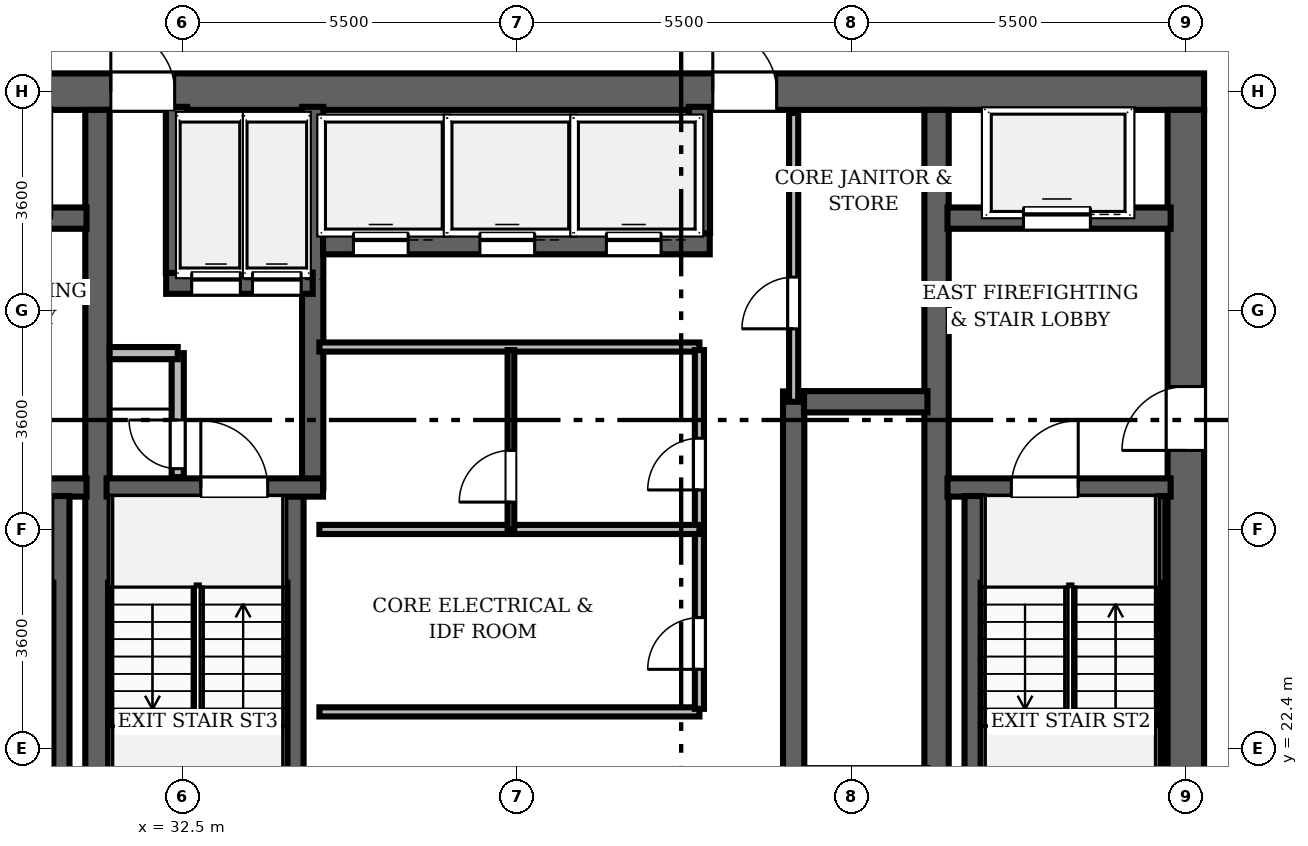
"""IFC4 building model, lengths in metres.
Left out: names, types, materials, properties, quantities, classifications, styles, units other than length and angle.
Written with IfcOpenShell. Run it as: python <this file> out.ifc"""

import sys

from ifc_helpers import new_model, si_unit, direction, frame, frame_2d, origin, place, context, subcontext, project, spatial, rectangle, extrude, element, fill, save


model = new_model("IFC4")
c1 = context("Model", 3, precision=1e-05, world=origin(), true_north=direction((0.0, 1.0)))
c2 = subcontext(c1, "Body", "Model", "MODEL_VIEW")
j1 = project(units=[si_unit("LENGTHUNIT", "METRE"), si_unit("PLANEANGLEUNIT", "RADIAN")], contexts=[c1])
p1 = place(None, origin())
s1 = spatial("IfcSite", under=j1, at=p1, CompositionType="ELEMENT")
p2 = place(p1, origin())
s2 = spatial("IfcBuilding", under=s1, at=p2, CompositionType="ELEMENT")
p3 = place(p2, frame((0.0, 0.0, 35.4)))
s3 = spatial("IfcBuildingStorey", under=s2, at=p3, CompositionType="ELEMENT", Elevation=35.4)
p4 = place(p3, frame((26.7, 33.2, 0.0), z_axis=(0.0, 0.0, 1.0), x_axis=(1.0, 0.0, 0.0)))
e1 = element("IfcWall", 1, at=p4, inside=s3, PredefinedType="SHEAR", context=c2, shape_type="SweptSolid", body=[
    extrude(rectangle(XDim=22.6, YDim=0.6, at=frame_2d((11.3, 0.0))), origin(), (0.0, 0.0, 1.0), 6.0),
])
p5 = place(p4, frame((4.62, 0.0, 0.0)))
e2 = element("IfcOpeningElement", 2, at=p5, cuts=e1, PredefinedType="OPENING", context=c2, shape_type="SweptSolid", body=[
    extrude(rectangle(XDim=1.05, YDim=2.15, at=frame_2d((0.525, 1.075))), frame((0.0, 0.31, 0.0), z_axis=(0.0, -1.0, 0.0), x_axis=(1.0, 0.0, 0.0)), (0.0, 0.0, 1.0), 0.62),
])
p6 = place(p4, frame((14.52, 0.0, 0.0)))
e3 = element("IfcOpeningElement", 3, at=p6, cuts=e1, PredefinedType="OPENING", context=c2, shape_type="SweptSolid", body=[
    extrude(rectangle(XDim=1.05, YDim=2.15, at=frame_2d((0.525, 1.075))), frame((0.0, 0.31, 0.0), z_axis=(0.0, -1.0, 0.0), x_axis=(1.0, 0.0, 0.0)), (0.0, 0.0, 1.0), 0.62),
])
p7 = place(p3, frame((49.0, 19.1, 0.0), z_axis=(0.0, 0.0, 1.0), x_axis=(0.0, 1.0, 0.0)))
e4 = element("IfcWall", 4, at=p7, inside=s3, PredefinedType="SHEAR", context=c2, shape_type="SweptSolid", body=[
    extrude(rectangle(XDim=13.8, YDim=0.6, at=frame_2d((6.9, 0.0))), origin(), (0.0, 0.0, 1.0), 6.0),
])
p8 = place(p7, frame((8.2, 0.0, 0.0)))
e5 = element("IfcOpeningElement", 5, at=p8, cuts=e4, PredefinedType="OPENING", context=c2, shape_type="SweptSolid", body=[
    extrude(rectangle(XDim=1.05, YDim=2.15, at=frame_2d((0.525, 1.075))), frame((0.0, 0.31, 0.0), z_axis=(0.0, -1.0, 0.0), x_axis=(1.0, 0.0, 0.0)), (0.0, 0.0, 1.0), 0.62),
])
for number, where, z_axis, x_axis in (
    (6, (31.1, 19.1, 0.0), (0.0, 0.0, 1.0), (0.0, 1.0, 0.0)),
    (7, (44.9, 19.1, 0.0), (0.0, 0.0, 1.0), (0.0, 1.0, 0.0)),
):
    element("IfcWall", number, at=place(p3, frame(where, z_axis=z_axis, x_axis=x_axis)), inside=s3, PredefinedType="SHEAR", context=c2, shape_type="SweptSolid", body=[
        extrude(rectangle(XDim=13.8, YDim=0.4, at=frame_2d((6.9, 0.0))), origin(), (0.0, 0.0, 1.0), 6.0),
    ])
p9 = place(p3, frame((27.25, 26.69, 0.0), z_axis=(0.0, 0.0, 1.0), x_axis=(1.0, 0.0, 0.0)))
e8 = element("IfcWall", 8, at=p9, inside=s3, PredefinedType="SHEAR", context=c2, shape_type="SweptSolid", body=[
    extrude(rectangle(XDim=3.67, YDim=0.3, at=frame_2d((1.835, 0.0))), origin(), (0.0, 0.0, 1.0), 6.0),
])
p10 = place(p9, frame((1.05, 0.0, 0.0)))
e9 = element("IfcOpeningElement", 9, at=p10, cuts=e8, PredefinedType="OPENING", context=c2, shape_type="SweptSolid", body=[
    extrude(rectangle(XDim=1.1, YDim=2.15, at=frame_2d((0.55, 1.075))), frame((0.0, 0.16, 0.0), z_axis=(0.0, -1.0, 0.0), x_axis=(1.0, 0.0, 0.0)), (0.0, 0.0, 1.0), 0.32),
])
p11 = place(p3, frame((30.49, 19.05, 0.0), z_axis=(0.0, 0.0, 1.0), x_axis=(0.0, 1.0, 0.0)))
e10 = element("IfcWall", 10, at=p11, inside=s3, PredefinedType="SHEAR", context=c2, shape_type="SweptSolid", body=[
    extrude(rectangle(XDim=7.5, YDim=0.3, at=frame_2d((3.75, 0.0))), origin(), (0.0, 0.0, 1.0), 6.0),
])
p12 = place(p3, frame((27.25, 31.12, 0.0), z_axis=(0.0, 0.0, 1.0), x_axis=(1.0, 0.0, 0.0)))
e11 = element("IfcWall", 11, at=p12, inside=s3, PredefinedType="SHEAR", context=c2, shape_type="SweptSolid", body=[
    extrude(rectangle(XDim=3.67, YDim=0.35, at=frame_2d((1.835, 0.0))), origin(), (0.0, 0.0, 1.0), 4.81),
])
p13 = place(p12, frame((1.25, 0.0, 0.0)))
e12 = element("IfcOpeningElement", 12, at=p13, cuts=e11, PredefinedType="OPENING", context=c2, shape_type="SweptSolid", body=[
    extrude(rectangle(XDim=1.1, YDim=2.15, at=frame_2d((0.55, 1.075))), frame((0.0, 0.185, 0.0), z_axis=(0.0, -1.0, 0.0), x_axis=(1.0, 0.0, 0.0)), (0.0, 0.0, 1.0), 0.37),
])
p14 = place(p3, frame((45.08, 26.69, 0.0), z_axis=(0.0, 0.0, 1.0), x_axis=(1.0, 0.0, 0.0)))
e13 = element("IfcWall", 13, at=p14, inside=s3, PredefinedType="SHEAR", context=c2, shape_type="SweptSolid", body=[
    extrude(rectangle(XDim=3.67, YDim=0.3, at=frame_2d((1.835, 0.0))), origin(), (0.0, 0.0, 1.0), 6.0),
])
p15 = place(p14, frame((1.05, 0.0, 0.0)))
e14 = element("IfcOpeningElement", 14, at=p15, cuts=e13, PredefinedType="OPENING", context=c2, shape_type="SweptSolid", body=[
    extrude(rectangle(XDim=1.1, YDim=2.15, at=frame_2d((0.55, 1.075))), frame((0.0, 0.16, 0.0), z_axis=(0.0, -1.0, 0.0), x_axis=(1.0, 0.0, 0.0)), (0.0, 0.0, 1.0), 0.32),
])
p16 = place(p3, frame((45.51, 19.05, 0.0), z_axis=(0.0, 0.0, 1.0), x_axis=(0.0, 1.0, 0.0)))
e15 = element("IfcWall", 15, at=p16, inside=s3, PredefinedType="SHEAR", context=c2, shape_type="SweptSolid", body=[
    extrude(rectangle(XDim=7.5, YDim=0.3, at=frame_2d((3.75, 0.0))), origin(), (0.0, 0.0, 1.0), 6.0),
])
p17 = place(p3, frame((48.605, 19.1, 0.0), z_axis=(0.0, 0.0, 1.0), x_axis=(0.0, 1.0, 0.0)))
e16 = element("IfcWall", 16, at=p17, inside=s3, PredefinedType="SHEAR", context=c2, shape_type="SweptSolid", body=[
    extrude(rectangle(XDim=7.45, YDim=0.12, at=frame_2d((3.725, 0.0))), origin(), (0.0, 0.0, 1.0), 6.0),
])
p18 = place(p3, frame((45.08, 31.12, 0.0), z_axis=(0.0, 0.0, 1.0), x_axis=(1.0, 0.0, 0.0)))
e17 = element("IfcWall", 17, at=p18, inside=s3, PredefinedType="SHEAR", context=c2, shape_type="SweptSolid", body=[
    extrude(rectangle(XDim=3.67, YDim=0.35, at=frame_2d((1.835, 0.0))), origin(), (0.0, 0.0, 1.0), 4.81),
])
p19 = place(p18, frame((1.25, 0.0, 0.0)))
e18 = element("IfcOpeningElement", 18, at=p19, cuts=e17, PredefinedType="OPENING", context=c2, shape_type="SweptSolid", body=[
    extrude(rectangle(XDim=1.1, YDim=2.15, at=frame_2d((0.55, 1.075))), frame((0.0, 0.185, 0.0), z_axis=(0.0, -1.0, 0.0), x_axis=(1.0, 0.0, 0.0)), (0.0, 0.0, 1.0), 0.37),
])
p20 = place(p3, frame((34.34, 19.05, 0.0), z_axis=(0.0, 0.0, 1.0), x_axis=(0.0, 1.0, 0.0)))
e19 = element("IfcWall", 19, at=p20, inside=s3, PredefinedType="SHEAR", context=c2, shape_type="SweptSolid", body=[
    extrude(rectangle(XDim=7.5, YDim=0.3, at=frame_2d((3.75, 0.0))), origin(), (0.0, 0.0, 1.0), 6.0),
])
p21 = place(p3, frame((34.64, 26.69, 0.0), z_axis=(0.0, 0.0, 1.0), x_axis=(0.0, 1.0, 0.0)))
e20 = element("IfcWall", 20, at=p21, inside=s3, PredefinedType="SHEAR", context=c2, shape_type="SweptSolid", body=[
    extrude(rectangle(XDim=6.26, YDim=0.35, at=frame_2d((3.13, 0.0))), origin(), (0.0, 0.0, 1.0), 6.0),
])
p22 = place(p3, frame((31.25, 26.69, 0.0), z_axis=(0.0, 0.0, 1.0), x_axis=(1.0, 0.0, 0.0)))
e21 = element("IfcWall", 21, at=p22, inside=s3, PredefinedType="SHEAR", context=c2, shape_type="SweptSolid", body=[
    extrude(rectangle(XDim=3.56, YDim=0.3, at=frame_2d((1.78, 0.0))), origin(), (0.0, 0.0, 1.0), 6.0),
])
p23 = place(p22, frame((1.55, 0.0, 0.0)))
e22 = element("IfcOpeningElement", 22, at=p23, cuts=e21, PredefinedType="OPENING", context=c2, shape_type="SweptSolid", body=[
    extrude(rectangle(XDim=1.1, YDim=2.15, at=frame_2d((0.55, 1.075))), frame((0.0, 0.16, 0.0), z_axis=(0.0, -1.0, 0.0), x_axis=(1.0, 0.0, 0.0)), (0.0, 0.0, 1.0), 0.32),
])
p24 = place(p3, frame((32.23, 30.05, 0.0), z_axis=(0.0, 0.0, 1.0), x_axis=(1.0, 0.0, 0.0)))
e23 = element("IfcWall", 23, at=p24, inside=s3, PredefinedType="SHEAR", context=c2, shape_type="SweptSolid", body=[
    extrude(rectangle(XDim=2.41, YDim=0.35, at=frame_2d((1.205, 0.0))), origin(), (0.0, 0.0, 1.0), 4.81),
])
p25 = place(p24, frame((0.42, 0.0, 0.0)))
e24 = element("IfcOpeningElement", 24, at=p25, cuts=e23, PredefinedType="OPENING", context=c2, shape_type="SweptSolid", body=[
    extrude(rectangle(XDim=0.8, YDim=2.15, at=frame_2d((0.4, 1.075))), frame((0.0, 0.185, 0.0), z_axis=(0.0, -1.0, 0.0), x_axis=(1.0, 0.0, 0.0)), (0.0, 0.0, 1.0), 0.37),
])
p26 = place(p24, frame((1.42, 0.0, 0.0)))
e25 = element("IfcOpeningElement", 25, at=p26, cuts=e23, PredefinedType="OPENING", context=c2, shape_type="SweptSolid", body=[
    extrude(rectangle(XDim=0.8, YDim=2.15, at=frame_2d((0.4, 1.075))), frame((0.0, 0.185, 0.0), z_axis=(0.0, -1.0, 0.0), x_axis=(1.0, 0.0, 0.0)), (0.0, 0.0, 1.0), 0.37),
])
p27 = place(p3, frame((32.4, 30.22, 0.0), z_axis=(0.0, 0.0, 1.0), x_axis=(0.0, 1.0, 0.0)))
e26 = element("IfcWall", 26, at=p27, inside=s3, PredefinedType="SHEAR", context=c2, shape_type="SweptSolid", body=[
    extrude(rectangle(XDim=2.73, YDim=0.35, at=frame_2d((1.365, 0.0))), origin(), (0.0, 0.0, 1.0), 4.81),
])
p28 = place(p3, frame((32.42, 26.86, 0.0), z_axis=(0.0, 0.0, 1.0), x_axis=(0.0, 1.0, 0.0)))
e27 = element("IfcWall", 27, at=p28, inside=s3, PredefinedType="PARTITIONING", context=c2, shape_type="SweptSolid", body=[
    extrude(rectangle(XDim=2.04, YDim=0.2, at=frame_2d((1.02, 0.0))), origin(), (0.0, 0.0, 1.0), 4.81),
])
p29 = place(p28, frame((0.14, 0.0, 0.0)))
e28 = element("IfcOpeningElement", 28, at=p29, cuts=e27, PredefinedType="OPENING", context=c2, shape_type="SweptSolid", body=[
    extrude(rectangle(XDim=0.8, YDim=2.05, at=frame_2d((0.4, 1.025))), frame((0.0, 0.11, 0.0), z_axis=(0.0, -1.0, 0.0), x_axis=(1.0, 0.0, 0.0)), (0.0, 0.0, 1.0), 0.22),
])
p30 = place(p3, frame((31.3, 28.9, 0.0), z_axis=(0.0, 0.0, 1.0), x_axis=(1.0, 0.0, 0.0)))
e29 = element("IfcWall", 29, at=p30, inside=s3, PredefinedType="PARTITIONING", context=c2, shape_type="SweptSolid", body=[
    extrude(rectangle(XDim=1.12, YDim=0.2, at=frame_2d((0.56, 0.0))), origin(), (0.0, 0.0, 1.0), 4.81),
])
p31 = place(p3, frame((42.55, 21.73, 0.0), z_axis=(0.0, 0.0, 1.0), x_axis=(0.0, 1.0, 0.0)))
e30 = element("IfcWall", 30, at=p31, inside=s3, PredefinedType="SHEAR", context=c2, shape_type="SweptSolid", body=[
    extrude(rectangle(XDim=6.54, YDim=0.35, at=frame_2d((3.27, 0.0))), origin(), (0.0, 0.0, 1.0), 4.81),
])
p32 = place(p3, frame((42.72, 28.1, 0.0), z_axis=(0.0, 0.0, 1.0), x_axis=(1.0, 0.0, 0.0)))
e31 = element("IfcWall", 31, at=p32, inside=s3, PredefinedType="SHEAR", context=c2, shape_type="SweptSolid", body=[
    extrude(rectangle(XDim=2.03, YDim=0.35, at=frame_2d((1.015, 0.0))), origin(), (0.0, 0.0, 1.0), 4.81),
])
p33 = place(p3, frame((34.81, 30.7, 0.0), z_axis=(0.0, 0.0, 1.0), x_axis=(1.0, 0.0, 0.0)))
e32 = element("IfcWall", 32, at=p33, inside=s3, PredefinedType="SHEAR", context=c2, shape_type="SweptSolid", body=[
    extrude(rectangle(XDim=6.36, YDim=0.35, at=frame_2d((3.18, 0.0))), origin(), (0.0, 0.0, 1.0), 4.81),
])
p34 = place(p33, frame((0.5, 0.0, 0.0)))
e33 = element("IfcOpeningElement", 33, at=p34, cuts=e32, PredefinedType="OPENING", context=c2, shape_type="SweptSolid", body=[
    extrude(rectangle(XDim=0.9, YDim=2.15, at=frame_2d((0.45, 1.075))), frame((0.0, 0.185, 0.0), z_axis=(0.0, -1.0, 0.0), x_axis=(1.0, 0.0, 0.0)), (0.0, 0.0, 1.0), 0.37),
])
p35 = place(p33, frame((2.58, 0.0, 0.0)))
e34 = element("IfcOpeningElement", 34, at=p35, cuts=e32, PredefinedType="OPENING", context=c2, shape_type="SweptSolid", body=[
    extrude(rectangle(XDim=0.9, YDim=2.15, at=frame_2d((0.45, 1.075))), frame((0.0, 0.185, 0.0), z_axis=(0.0, -1.0, 0.0), x_axis=(1.0, 0.0, 0.0)), (0.0, 0.0, 1.0), 0.37),
])
p36 = place(p33, frame((4.66, 0.0, 0.0)))
e35 = element("IfcOpeningElement", 35, at=p36, cuts=e32, PredefinedType="OPENING", context=c2, shape_type="SweptSolid", body=[
    extrude(rectangle(XDim=0.9, YDim=2.15, at=frame_2d((0.45, 1.075))), frame((0.0, 0.185, 0.0), z_axis=(0.0, -1.0, 0.0), x_axis=(1.0, 0.0, 0.0)), (0.0, 0.0, 1.0), 0.37),
])
p37 = place(p3, frame((41.0, 30.87, 0.0), z_axis=(0.0, 0.0, 1.0), x_axis=(0.0, 1.0, 0.0)))
e36 = element("IfcWall", 36, at=p37, inside=s3, PredefinedType="SHEAR", context=c2, shape_type="SweptSolid", body=[
    extrude(rectangle(XDim=2.08, YDim=0.35, at=frame_2d((1.04, 0.0))), origin(), (0.0, 0.0, 1.0), 4.81),
])
for number, where, z_axis, x_axis in (
    (37, (34.75, 29.0, 0.0), (0.0, 0.0, 1.0), (1.0, 0.0, 0.0)),
    (38, (34.75, 23.0, 0.0), (0.0, 0.0, 1.0), (1.0, 0.0, 0.0)),
):
    element("IfcWall", number, at=place(p3, frame(where, z_axis=z_axis, x_axis=x_axis)), inside=s3, PredefinedType="PARTITIONING", context=c2, shape_type="SweptSolid", body=[
        extrude(rectangle(XDim=6.25, YDim=0.15, at=frame_2d((3.125, 0.0))), origin(), (0.0, 0.0, 1.0), 4.81),
    ])
p38 = place(p3, frame((41.0, 23.05, 0.0), z_axis=(0.0, 0.0, 1.0), x_axis=(0.0, 1.0, 0.0)))
e39 = element("IfcWall", 39, at=p38, inside=s3, PredefinedType="PARTITIONING", context=c2, shape_type="SweptSolid", body=[
    extrude(rectangle(XDim=5.9, YDim=0.15, at=frame_2d((2.95, 0.0))), origin(), (0.0, 0.0, 1.0), 4.81),
])
p39 = place(p38, frame((0.65, 0.0, 0.0)))
e40 = element("IfcOpeningElement", 40, at=p39, cuts=e39, PredefinedType="OPENING", context=c2, shape_type="SweptSolid", body=[
    extrude(rectangle(XDim=0.85, YDim=2.1, at=frame_2d((0.425, 1.05))), frame((0.0, 0.085, 0.0), z_axis=(0.0, -1.0, 0.0), x_axis=(1.0, 0.0, 0.0)), (0.0, 0.0, 1.0), 0.17),
])
p40 = place(p38, frame((3.6, 0.0, 0.0)))
e41 = element("IfcOpeningElement", 41, at=p40, cuts=e39, PredefinedType="OPENING", context=c2, shape_type="SweptSolid", body=[
    extrude(rectangle(XDim=0.85, YDim=2.1, at=frame_2d((0.425, 1.05))), frame((0.0, 0.085, 0.0), z_axis=(0.0, -1.0, 0.0), x_axis=(1.0, 0.0, 0.0)), (0.0, 0.0, 1.0), 0.17),
])
p41 = place(p3, frame((34.75, 26.0, 0.0), z_axis=(0.0, 0.0, 1.0), x_axis=(1.0, 0.0, 0.0)))
e42 = element("IfcWall", 42, at=p41, inside=s3, PredefinedType="PARTITIONING", context=c2, shape_type="SweptSolid", body=[
    extrude(rectangle(XDim=6.25, YDim=0.15, at=frame_2d((3.125, 0.0))), origin(), (0.0, 0.0, 1.0), 4.81),
])
p42 = place(p3, frame((37.9, 26.0, 0.0), z_axis=(0.0, 0.0, 1.0), x_axis=(0.0, 1.0, 0.0)))
e43 = element("IfcWall", 43, at=p42, inside=s3, PredefinedType="PARTITIONING", context=c2, shape_type="SweptSolid", body=[
    extrude(rectangle(XDim=2.95, YDim=0.11, at=frame_2d((1.475, 0.0))), origin(), (0.0, 0.0, 1.0), 4.81),
])
p43 = place(p42, frame((0.45, 0.0, 0.0)))
e44 = element("IfcOpeningElement", 44, at=p43, cuts=e43, PredefinedType="OPENING", context=c2, shape_type="SweptSolid", body=[
    extrude(rectangle(XDim=0.85, YDim=2.1, at=frame_2d((0.425, 1.05))), frame((0.0, 0.065, 0.0), z_axis=(0.0, -1.0, 0.0), x_axis=(1.0, 0.0, 0.0)), (0.0, 0.0, 1.0), 0.13),
])
p44 = place(p3, frame((42.55, 28.1, 0.0), z_axis=(0.0, 0.0, 1.0), x_axis=(0.0, 1.0, 0.0)))
e45 = element("IfcWall", 45, at=p44, inside=s3, PredefinedType="PARTITIONING", context=c2, shape_type="SweptSolid", body=[
    extrude(rectangle(XDim=4.75, YDim=0.15, at=frame_2d((2.375, 0.0))), origin(), (0.0, 0.0, 1.0), 4.81),
])
p45 = place(p44, frame((1.2, 0.0, 0.0)))
e46 = element("IfcOpeningElement", 46, at=p45, cuts=e45, PredefinedType="OPENING", context=c2, shape_type="SweptSolid", body=[
    extrude(rectangle(XDim=0.85, YDim=2.1, at=frame_2d((0.425, 1.05))), frame((0.0, 0.085, 0.0), z_axis=(0.0, -1.0, 0.0), x_axis=(1.0, 0.0, 0.0)), (0.0, 0.0, 1.0), 0.17),
])
p46 = place(p15, origin())
e47 = element("IfcDoor", 47, at=p46, inside=s3, OperationType="SINGLE_SWING_RIGHT", PredefinedType="DOOR", context=c2, shape_type="SweptSolid", body=[
    extrude(rectangle(XDim=1.1, YDim=2.15, at=frame_2d((0.55, 1.075))), frame((0.0, 0.025, 0.0), z_axis=(0.0, -1.0, 0.0), x_axis=(1.0, 0.0, 0.0)), (0.0, 0.0, 1.0), 0.05),
])
fill(e14, e47)
p47 = place(p8, origin())
e48 = element("IfcDoor", 48, at=p47, inside=s3, OperationType="SINGLE_SWING_LEFT", PredefinedType="DOOR", context=c2, shape_type="SweptSolid", body=[
    extrude(rectangle(XDim=1.05, YDim=2.15, at=frame_2d((0.525, 1.075))), frame((0.0, 0.025, 0.0), z_axis=(0.0, -1.0, 0.0), x_axis=(1.0, 0.0, 0.0)), (0.0, 0.0, 1.0), 0.05),
])
fill(e5, e48)
p48 = place(p23, origin())
e49 = element("IfcDoor", 49, at=p48, inside=s3, OperationType="SINGLE_SWING_LEFT", PredefinedType="DOOR", context=c2, shape_type="SweptSolid", body=[
    extrude(rectangle(XDim=1.1, YDim=2.15, at=frame_2d((0.55, 1.075))), frame((0.0, 0.025, 0.0), z_axis=(0.0, -1.0, 0.0), x_axis=(1.0, 0.0, 0.0)), (0.0, 0.0, 1.0), 0.05),
])
fill(e22, e49)
p49 = place(p29, origin())
e50 = element("IfcDoor", 50, at=p49, inside=s3, OperationType="SINGLE_SWING_RIGHT", PredefinedType="DOOR", context=c2, shape_type="SweptSolid", body=[
    extrude(rectangle(XDim=0.8, YDim=2.05, at=frame_2d((0.4, 1.025))), frame((0.0, 0.025, 0.0), z_axis=(0.0, -1.0, 0.0), x_axis=(1.0, 0.0, 0.0)), (0.0, 0.0, 1.0), 0.05),
])
fill(e28, e50)
p50 = place(p5, origin())
e51 = element("IfcDoor", 51, at=p50, inside=s3, OperationType="SINGLE_SWING_LEFT", PredefinedType="DOOR", context=c2, shape_type="SweptSolid", body=[
    extrude(rectangle(XDim=1.05, YDim=2.15, at=frame_2d((0.525, 1.075))), frame((0.0, 0.025, 0.0), z_axis=(0.0, -1.0, 0.0), x_axis=(1.0, 0.0, 0.0)), (0.0, 0.0, 1.0), 0.05),
])
fill(e2, e51)
p51 = place(p6, origin())
e52 = element("IfcDoor", 52, at=p51, inside=s3, OperationType="SINGLE_SWING_LEFT", PredefinedType="DOOR", context=c2, shape_type="SweptSolid", body=[
    extrude(rectangle(XDim=1.05, YDim=2.15, at=frame_2d((0.525, 1.075))), frame((0.0, 0.025, 0.0), z_axis=(0.0, -1.0, 0.0), x_axis=(1.0, 0.0, 0.0)), (0.0, 0.0, 1.0), 0.05),
])
fill(e3, e52)
p52 = place(p39, origin())
e53 = element("IfcDoor", 53, at=p52, inside=s3, OperationType="SINGLE_SWING_LEFT", PredefinedType="DOOR", context=c2, shape_type="SweptSolid", body=[
    extrude(rectangle(XDim=0.85, YDim=2.1, at=frame_2d((0.425, 1.05))), frame((0.0, 0.025, 0.0), z_axis=(0.0, -1.0, 0.0), x_axis=(1.0, 0.0, 0.0)), (0.0, 0.0, 1.0), 0.05),
])
fill(e40, e53)
p53 = place(p40, origin())
e54 = element("IfcDoor", 54, at=p53, inside=s3, OperationType="SINGLE_SWING_LEFT", PredefinedType="DOOR", context=c2, shape_type="SweptSolid", body=[
    extrude(rectangle(XDim=0.85, YDim=2.1, at=frame_2d((0.425, 1.05))), frame((0.0, 0.025, 0.0), z_axis=(0.0, -1.0, 0.0), x_axis=(1.0, 0.0, 0.0)), (0.0, 0.0, 1.0), 0.05),
])
fill(e41, e54)
p54 = place(p43, origin())
e55 = element("IfcDoor", 55, at=p54, inside=s3, OperationType="SINGLE_SWING_LEFT", PredefinedType="DOOR", context=c2, shape_type="SweptSolid", body=[
    extrude(rectangle(XDim=0.85, YDim=2.1, at=frame_2d((0.425, 1.05))), frame((0.0, 0.025, 0.0), z_axis=(0.0, -1.0, 0.0), x_axis=(1.0, 0.0, 0.0)), (0.0, 0.0, 1.0), 0.05),
])
fill(e44, e55)
p55 = place(p45, origin())
e56 = element("IfcDoor", 56, at=p55, inside=s3, OperationType="SINGLE_SWING_LEFT", PredefinedType="DOOR", context=c2, shape_type="SweptSolid", body=[
    extrude(rectangle(XDim=0.85, YDim=2.1, at=frame_2d((0.425, 1.05))), frame((0.0, 0.025, 0.0), z_axis=(0.0, -1.0, 0.0), x_axis=(1.0, 0.0, 0.0)), (0.0, 0.0, 1.0), 0.05),
])
fill(e46, e56)
p56 = place(p34, origin())
e57 = element("IfcDoor", 57, at=p56, inside=s3, OperationType="SLIDING_TO_LEFT", PredefinedType="DOOR", context=c2, shape_type="SweptSolid", body=[
    extrude(rectangle(XDim=0.9, YDim=2.15, at=frame_2d((0.45, 1.075))), frame((0.0, 0.025, 0.0), z_axis=(0.0, -1.0, 0.0), x_axis=(1.0, 0.0, 0.0)), (0.0, 0.0, 1.0), 0.05),
])
fill(e33, e57)
p57 = place(p35, origin())
e58 = element("IfcDoor", 58, at=p57, inside=s3, OperationType="SLIDING_TO_LEFT", PredefinedType="DOOR", context=c2, shape_type="SweptSolid", body=[
    extrude(rectangle(XDim=0.9, YDim=2.15, at=frame_2d((0.45, 1.075))), frame((0.0, 0.025, 0.0), z_axis=(0.0, -1.0, 0.0), x_axis=(1.0, 0.0, 0.0)), (0.0, 0.0, 1.0), 0.05),
])
fill(e34, e58)
p58 = place(p36, origin())
e59 = element("IfcDoor", 59, at=p58, inside=s3, OperationType="SLIDING_TO_LEFT", PredefinedType="DOOR", context=c2, shape_type="SweptSolid", body=[
    extrude(rectangle(XDim=0.9, YDim=2.15, at=frame_2d((0.45, 1.075))), frame((0.0, 0.025, 0.0), z_axis=(0.0, -1.0, 0.0), x_axis=(1.0, 0.0, 0.0)), (0.0, 0.0, 1.0), 0.05),
])
fill(e35, e59)
p59 = place(p19, origin())
e60 = element("IfcDoor", 60, at=p59, inside=s3, OperationType="SLIDING_TO_LEFT", PredefinedType="DOOR", context=c2, shape_type="SweptSolid", body=[
    extrude(rectangle(XDim=1.1, YDim=2.15, at=frame_2d((0.55, 1.075))), frame((0.0, 0.025, 0.0), z_axis=(0.0, -1.0, 0.0), x_axis=(1.0, 0.0, 0.0)), (0.0, 0.0, 1.0), 0.05),
])
fill(e18, e60)
p60 = place(p25, origin())
e61 = element("IfcDoor", 61, at=p60, inside=s3, OperationType="SLIDING_TO_LEFT", PredefinedType="DOOR", context=c2, shape_type="SweptSolid", body=[
    extrude(rectangle(XDim=0.8, YDim=2.15, at=frame_2d((0.4, 1.075))), frame((0.0, 0.025, 0.0), z_axis=(0.0, -1.0, 0.0), x_axis=(1.0, 0.0, 0.0)), (0.0, 0.0, 1.0), 0.05),
])
fill(e24, e61)
p61 = place(p26, origin())
e62 = element("IfcDoor", 62, at=p61, inside=s3, OperationType="SLIDING_TO_LEFT", PredefinedType="DOOR", context=c2, shape_type="SweptSolid", body=[
    extrude(rectangle(XDim=0.8, YDim=2.15, at=frame_2d((0.4, 1.075))), frame((0.0, 0.025, 0.0), z_axis=(0.0, -1.0, 0.0), x_axis=(1.0, 0.0, 0.0)), (0.0, 0.0, 1.0), 0.05),
])
fill(e25, e62)
save(model, sys.argv[1])
